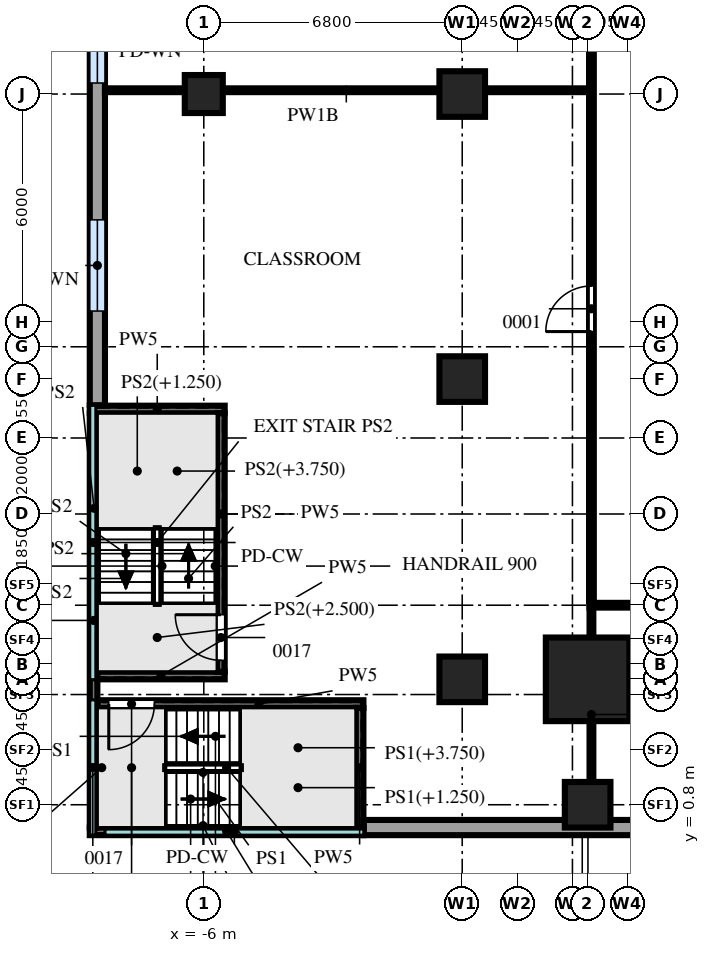
"""IFC4 building model, lengths in metres.
Left out: names, types, materials, properties, quantities, classifications, styles, units other than length and angle.
Written with IfcOpenShell. Run it as: python <this file> out.ifc"""

import sys

from ifc_helpers import new_model, si_unit, direction, frame, frame_2d, origin, origin_2d, place, context, subcontext, project, spatial, rectangle, extrude, source, transform, mapped, element, fill, save


model = new_model("IFC4")
c1 = context("Model", 3, precision=1e-05, world=origin(), true_north=direction((0.0, 1.0)))
c2 = subcontext(c1, "Body", "Model", "MODEL_VIEW")
j1 = project(units=[si_unit("LENGTHUNIT", "METRE"), si_unit("PLANEANGLEUNIT", "RADIAN")], contexts=[c1])
p1 = place(None, origin())
s1 = spatial("IfcSite", under=j1, at=p1, CompositionType="ELEMENT")
p2 = place(p1, origin())
s2 = spatial("IfcBuilding", under=s1, at=p2, CompositionType="ELEMENT")
p3 = place(p2, frame((0.0, 0.0, 23.5)))
s3 = spatial("IfcBuildingStorey", under=s2, at=p3, CompositionType="ELEMENT", Elevation=23.5)
m1 = source(origin(), c2, "Body", "SweptSolid", [
    extrude(rectangle(XDim=2.2, YDim=2.2, at=origin_2d()), origin(), (0.0, 0.0, 1.0), 4.7),
])
p4 = place(p3, frame((4.1, 4.1, 0.0), z_axis=(0.0, 0.0, 1.0), x_axis=(1.0, 0.0, 0.0)))
e1 = element("IfcColumn", 1, at=p4, inside=s3, PredefinedType="COLUMN", context=c2, shape_type="MappedRepresentation", body=[
    mapped(m1, transform((0.0, 0.0, 0.0))),
])
m2 = source(origin(), c2, "Body", "SweptSolid", [
    extrude(rectangle(XDim=1.2, YDim=1.2, at=origin_2d()), origin(), (0.0, 0.0, 1.0), 4.7),
])
for number, where, z_axis, x_axis in (
    (2, (4.1, 0.8, 0.0), (0.0, 0.0, 1.0), (1.0, 0.0, 0.0)),
    (3, (0.8, 4.1, 0.0), (0.0, 0.0, 1.0), (1.0, 0.0, 0.0)),
    (4, (0.8, 12.0, 0.0), (0.0, 0.0, 1.0), (1.0, 0.0, 0.0)),
    (5, (0.8, 19.5, 0.0), (0.0, 0.0, 1.0), (1.0, 0.0, 0.0)),
):
    element("IfcColumn", number, at=place(p3, frame(where, z_axis=z_axis, x_axis=x_axis)), inside=s3, PredefinedType="COLUMN", context=c2, shape_type="MappedRepresentation", body=[
        mapped(m2, transform((0.0, 0.0, 0.0))),
    ])
m3 = source(origin(), c2, "Body", "SweptSolid", [
    extrude(rectangle(XDim=1.0, YDim=1.0, at=origin_2d()), origin(), (0.0, 0.0, 1.0), 4.7),
])
p5 = place(p3, frame((-6.0, 19.5, 0.0), z_axis=(0.0, 0.0, 1.0), x_axis=(1.0, 0.0, 0.0)))
e6 = element("IfcColumn", 6, at=p5, inside=s3, PredefinedType="COLUMN", context=c2, shape_type="MappedRepresentation", body=[
    mapped(m3, transform((0.0, 0.0, 0.0))),
])
m4 = source(origin(), c2, "Body", "SweptSolid", [
    extrude(rectangle(XDim=31.38, YDim=0.4, at=frame_2d((15.69, 0.0))), origin(), (0.0, 0.0, 1.0), 4.7),
])
p6 = place(p3, frame((-8.8, 42.69, 0.0), z_axis=(0.0, 0.0, 1.0), x_axis=(0.0, -1.0, 0.0)))
e7 = element("IfcWall", 7, at=p6, inside=s3, PredefinedType="SOLIDWALL", context=c2, shape_type="MappedRepresentation", body=[
    mapped(m4, transform((0.0, 0.0, 0.0))),
])
m5 = source(origin(), c2, "Body", "SweptSolid", [
    extrude(rectangle(XDim=2.4, YDim=2.4, at=frame_2d((1.2, 1.2))), frame((0.0, 0.21, 0.0), z_axis=(0.0, -1.0, 0.0), x_axis=(1.0, 0.0, 0.0)), (0.0, 0.0, 1.0), 0.42),
])
p7 = place(p6, frame((2.5, 0.0, 1.0)))
e8 = element("IfcOpeningElement", 8, at=p7, cuts=e7, PredefinedType="OPENING", context=c2, shape_type="MappedRepresentation", body=[
    mapped(m5, transform((0.0, 0.0, 0.0))),
])
p8 = place(p6, frame((8.5, 0.0, 1.0)))
e9 = element("IfcOpeningElement", 9, at=p8, cuts=e7, PredefinedType="OPENING", context=c2, shape_type="MappedRepresentation", body=[
    mapped(m5, transform((0.0, 0.0, 0.0))),
])
p9 = place(p6, frame((14.5, 0.0, 1.0)))
e10 = element("IfcOpeningElement", 10, at=p9, cuts=e7, PredefinedType="OPENING", context=c2, shape_type="MappedRepresentation", body=[
    mapped(m5, transform((0.0, 0.0, 0.0))),
])
p10 = place(p6, frame((20.5, 0.0, 1.0)))
e11 = element("IfcOpeningElement", 11, at=p10, cuts=e7, PredefinedType="OPENING", context=c2, shape_type="MappedRepresentation", body=[
    mapped(m5, transform((0.0, 0.0, 0.0))),
])
p11 = place(p6, frame((26.5, 0.0, 1.0)))
e12 = element("IfcOpeningElement", 12, at=p11, cuts=e7, PredefinedType="OPENING", context=c2, shape_type="MappedRepresentation", body=[
    mapped(m5, transform((0.0, 0.0, 0.0))),
])
m6 = source(origin(), c2, "Body", "SweptSolid", [
    extrude(rectangle(XDim=33.04, YDim=0.4, at=frame_2d((16.52, 0.0))), origin(), (0.0, 0.0, 1.0), 4.7),
])
p12 = place(p3, frame((-1.79, 0.2, 0.0), z_axis=(0.0, 0.0, 1.0), x_axis=(1.0, 0.0, 0.0)))
e13 = element("IfcWall", 13, at=p12, inside=s3, PredefinedType="SOLIDWALL", context=c2, shape_type="MappedRepresentation", body=[
    mapped(m6, transform((0.0, 0.0, 0.0))),
])
p13 = place(p12, frame((9.3, 0.0, 1.0)))
e14 = element("IfcOpeningElement", 14, at=p13, cuts=e13, PredefinedType="OPENING", context=c2, shape_type="MappedRepresentation", body=[
    mapped(m5, transform((0.0, 0.0, 0.0))),
])
p14 = place(p12, frame((15.3, 0.0, 1.0)))
e15 = element("IfcOpeningElement", 15, at=p14, cuts=e13, PredefinedType="OPENING", context=c2, shape_type="MappedRepresentation", body=[
    mapped(m5, transform((0.0, 0.0, 0.0))),
])
m7 = source(origin(), c2, "Body", "SweptSolid", [
    extrude(rectangle(XDim=7.2, YDim=0.2, at=frame_2d((3.6, 0.0))), origin(), (0.0, 0.0, 1.0), 4.7),
])
p15 = place(p3, frame((-9.0, 0.1, 0.0), z_axis=(0.0, 0.0, 1.0), x_axis=(1.0, 0.0, 0.0)))
e16 = element("IfcWall", 16, at=p15, inside=s3, PredefinedType="PARTITIONING", context=c2, shape_type="MappedRepresentation", body=[
    mapped(m7, transform((0.0, 0.0, 0.0))),
])
m8 = source(origin(), c2, "Body", "SweptSolid", [
    extrude(rectangle(XDim=7.0, YDim=0.2, at=frame_2d((3.5, 0.0))), origin(), (0.0, 0.0, 1.0), 4.7),
])
p16 = place(p3, frame((-8.8, 3.45, 0.0), z_axis=(0.0, 0.0, 1.0), x_axis=(1.0, 0.0, 0.0)))
e17 = element("IfcWall", 17, at=p16, inside=s3, PredefinedType="PARTITIONING", context=c2, shape_type="MappedRepresentation", body=[
    mapped(m8, transform((0.0, 0.0, 0.0))),
])
m9 = source(origin(), c2, "Body", "SweptSolid", [
    extrude(rectangle(XDim=1.2, YDim=2.1, at=frame_2d((0.6, 1.05))), frame((0.0, 0.11, 0.0), z_axis=(0.0, -1.0, 0.0), x_axis=(1.0, 0.0, 0.0)), (0.0, 0.0, 1.0), 0.22),
])
p17 = place(p16, frame((0.3, 0.0, 0.0)))
e18 = element("IfcOpeningElement", 18, at=p17, cuts=e17, PredefinedType="OPENING", context=c2, shape_type="MappedRepresentation", body=[
    mapped(m9, transform((0.0, 0.0, 0.0))),
])
m10 = source(origin(), c2, "Body", "SweptSolid", [
    extrude(rectangle(XDim=10.9, YDim=0.2, at=frame_2d((5.45, 0.0))), origin(), (0.0, 0.0, 1.0), 4.7),
])
p18 = place(p3, frame((-8.9, 0.2, 0.0), z_axis=(0.0, 0.0, 1.0), x_axis=(0.0, 1.0, 0.0)))
e19 = element("IfcWall", 19, at=p18, inside=s3, PredefinedType="PARTITIONING", context=c2, shape_type="MappedRepresentation", body=[
    mapped(m10, transform((0.0, 0.0, 0.0))),
])
m11 = source(origin(), c2, "Body", "SweptSolid", [
    extrude(rectangle(XDim=3.15, YDim=0.2, at=frame_2d((1.575, 0.0))), origin(), (0.0, 0.0, 1.0), 4.7),
])
p19 = place(p3, frame((-1.9, 0.2, 0.0), z_axis=(0.0, 0.0, 1.0), x_axis=(0.0, 1.0, 0.0)))
e20 = element("IfcWall", 20, at=p19, inside=s3, PredefinedType="PARTITIONING", context=c2, shape_type="MappedRepresentation", body=[
    mapped(m11, transform((0.0, 0.0, 0.0))),
])
m12 = source(origin(), c2, "Body", "SweptSolid", [
    extrude(rectangle(XDim=3.35, YDim=0.2, at=frame_2d((1.675, 0.0))), origin(), (0.0, 0.0, 1.0), 4.7),
])
p20 = place(p3, frame((-8.8, 4.2, 0.0), z_axis=(0.0, 0.0, 1.0), x_axis=(1.0, 0.0, 0.0)))
e21 = element("IfcWall", 21, at=p20, inside=s3, PredefinedType="PARTITIONING", context=c2, shape_type="MappedRepresentation", body=[
    mapped(m12, transform((0.0, 0.0, 0.0))),
])
m13 = source(origin(), c2, "Body", "SweptSolid", [
    extrude(rectangle(XDim=3.55, YDim=0.2, at=frame_2d((1.775, 0.0))), origin(), (0.0, 0.0, 1.0), 4.7),
])
p21 = place(p3, frame((-9.0, 11.2, 0.0), z_axis=(0.0, 0.0, 1.0), x_axis=(1.0, 0.0, 0.0)))
e22 = element("IfcWall", 22, at=p21, inside=s3, PredefinedType="PARTITIONING", context=c2, shape_type="MappedRepresentation", body=[
    mapped(m13, transform((0.0, 0.0, 0.0))),
])
m14 = source(origin(), c2, "Body", "SweptSolid", [
    extrude(rectangle(XDim=6.8, YDim=0.2, at=frame_2d((3.4, 0.0))), origin(), (0.0, 0.0, 1.0), 4.7),
])
p22 = place(p3, frame((-5.55, 4.3, 0.0), z_axis=(0.0, 0.0, 1.0), x_axis=(0.0, 1.0, 0.0)))
e23 = element("IfcWall", 23, at=p22, inside=s3, PredefinedType="PARTITIONING", context=c2, shape_type="MappedRepresentation", body=[
    mapped(m14, transform((0.0, 0.0, 0.0))),
])
p23 = place(p22, frame((0.3, 0.0, 0.0)))
e24 = element("IfcOpeningElement", 24, at=p23, cuts=e23, PredefinedType="OPENING", context=c2, shape_type="MappedRepresentation", body=[
    mapped(m9, transform((0.0, 0.0, 0.0))),
])
m15 = source(origin(), c2, "Body", "SweptSolid", [
    extrude(rectangle(XDim=5.55, YDim=0.1, at=frame_2d((2.775, 0.0))), origin(), (0.0, 0.0, 1.0), 4.7),
])
p24 = place(p3, frame((4.2, 0.4, 0.0), z_axis=(0.0, 0.0, 1.0), x_axis=(0.0, 1.0, 0.0)))
e25 = element("IfcWall", 25, at=p24, inside=s3, PredefinedType="PARTITIONING", context=c2, shape_type="MappedRepresentation", body=[
    mapped(m15, transform((0.0, 0.0, 0.0))),
])
m16 = source(origin(), c2, "Body", "SweptSolid", [
    extrude(rectangle(XDim=22.3, YDim=0.125, at=frame_2d((11.15, 0.0))), origin(), (0.0, 0.0, 1.0), 4.7),
])
p25 = place(p3, frame((4.15, 6.05, 0.0), z_axis=(0.0, 0.0, 1.0), x_axis=(1.0, 0.0, 0.0)))
e26 = element("IfcWall", 26, at=p25, inside=s3, PredefinedType="PARTITIONING", context=c2, shape_type="MappedRepresentation", body=[
    mapped(m16, transform((0.0, 0.0, 0.0))),
])
m17 = source(origin(), c2, "Body", "SweptSolid", [
    extrude(rectangle(XDim=1.2, YDim=2.1, at=frame_2d((0.6, 1.05))), frame((0.0, 0.073, 0.0), z_axis=(0.0, -1.0, 0.0), x_axis=(1.0, 0.0, 0.0)), (0.0, 0.0, 1.0), 0.145),
])
p26 = place(p25, frame((9.2, 0.0, 0.0)))
e27 = element("IfcOpeningElement", 27, at=p26, cuts=e26, PredefinedType="OPENING", context=c2, shape_type="MappedRepresentation", body=[
    mapped(m17, transform((0.0, 0.0, 0.0))),
])
m18 = source(origin(), c2, "Body", "SweptSolid", [
    extrude(rectangle(XDim=41.8, YDim=0.125, at=frame_2d((20.9, 0.0))), origin(), (0.0, 0.0, 1.0), 4.7),
])
p27 = place(p3, frame((4.2, 6.15, 0.0), z_axis=(0.0, 0.0, 1.0), x_axis=(0.0, 1.0, 0.0)))
e28 = element("IfcWall", 28, at=p27, inside=s3, PredefinedType="PARTITIONING", context=c2, shape_type="MappedRepresentation", body=[
    mapped(m18, transform((0.0, 0.0, 0.0))),
])
p28 = place(p27, frame((7.1, 0.0, 0.0)))
e29 = element("IfcOpeningElement", 29, at=p28, cuts=e28, PredefinedType="OPENING", context=c2, shape_type="MappedRepresentation", body=[
    mapped(m17, transform((0.0, 0.0, 0.0))),
])
p29 = place(p27, frame((25.85, 0.0, 0.0)))
e30 = element("IfcOpeningElement", 30, at=p29, cuts=e28, PredefinedType="OPENING", context=c2, shape_type="MappedRepresentation", body=[
    mapped(m17, transform((0.0, 0.0, 0.0))),
])
m19 = source(origin(), c2, "Body", "SweptSolid", [
    extrude(rectangle(XDim=12.7, YDim=0.1, at=frame_2d((6.35, 0.0))), origin(), (0.0, 0.0, 1.0), 4.7),
])
p30 = place(p3, frame((-8.6, 19.6, 0.0), z_axis=(0.0, 0.0, 1.0), x_axis=(1.0, 0.0, 0.0)))
e31 = element("IfcWall", 31, at=p30, inside=s3, PredefinedType="PARTITIONING", context=c2, shape_type="MappedRepresentation", body=[
    mapped(m19, transform((0.0, 0.0, 0.0))),
])
m20 = source(origin(), c2, "Body", "SweptSolid", [
    extrude(rectangle(XDim=2.4, YDim=2.4, at=frame_2d((1.2, 1.2))), frame((0.0, 0.03, 0.0), z_axis=(0.0, -1.0, 0.0), x_axis=(1.0, 0.0, 0.0)), (0.0, 0.0, 1.0), 0.06),
])
p31 = place(p10, origin())
e32 = element("IfcWindow", 32, at=p31, inside=s3, PartitioningType="SINGLE_PANEL", PredefinedType="WINDOW", context=c2, shape_type="MappedRepresentation", body=[
    mapped(m20, transform((0.0, 0.0, 0.0))),
])
fill(e11, e32)
p32 = place(p11, origin())
e33 = element("IfcWindow", 33, at=p32, inside=s3, PartitioningType="SINGLE_PANEL", PredefinedType="WINDOW", context=c2, shape_type="MappedRepresentation", body=[
    mapped(m20, transform((0.0, 0.0, 0.0))),
])
fill(e12, e33)
m21 = source(origin(), c2, "Body", "SweptSolid", [
    extrude(rectangle(XDim=1.2, YDim=2.1, at=frame_2d((0.6, 1.05))), frame((0.0, 0.025, 0.0), z_axis=(0.0, -1.0, 0.0), x_axis=(1.0, 0.0, 0.0)), (0.0, 0.0, 1.0), 0.05),
])
p33 = place(p28, origin())
e34 = element("IfcDoor", 34, at=p33, inside=s3, OperationType="SINGLE_SWING_RIGHT", PredefinedType="DOOR", context=c2, shape_type="MappedRepresentation", body=[
    mapped(m21, transform((0.0, 0.0, 0.0))),
])
fill(e29, e34)
p34 = place(p17, origin())
e35 = element("IfcDoor", 35, at=p34, inside=s3, OperationType="SINGLE_SWING_LEFT", PredefinedType="DOOR", context=c2, shape_type="MappedRepresentation", body=[
    mapped(m21, transform((0.0, 0.0, 0.0))),
])
fill(e18, e35)
p35 = place(p23, origin())
e36 = element("IfcDoor", 36, at=p35, inside=s3, OperationType="SINGLE_SWING_LEFT", PredefinedType="DOOR", context=c2, shape_type="MappedRepresentation", body=[
    mapped(m21, transform((0.0, 0.0, 0.0))),
])
fill(e24, e36)
save(model, sys.argv[1])
